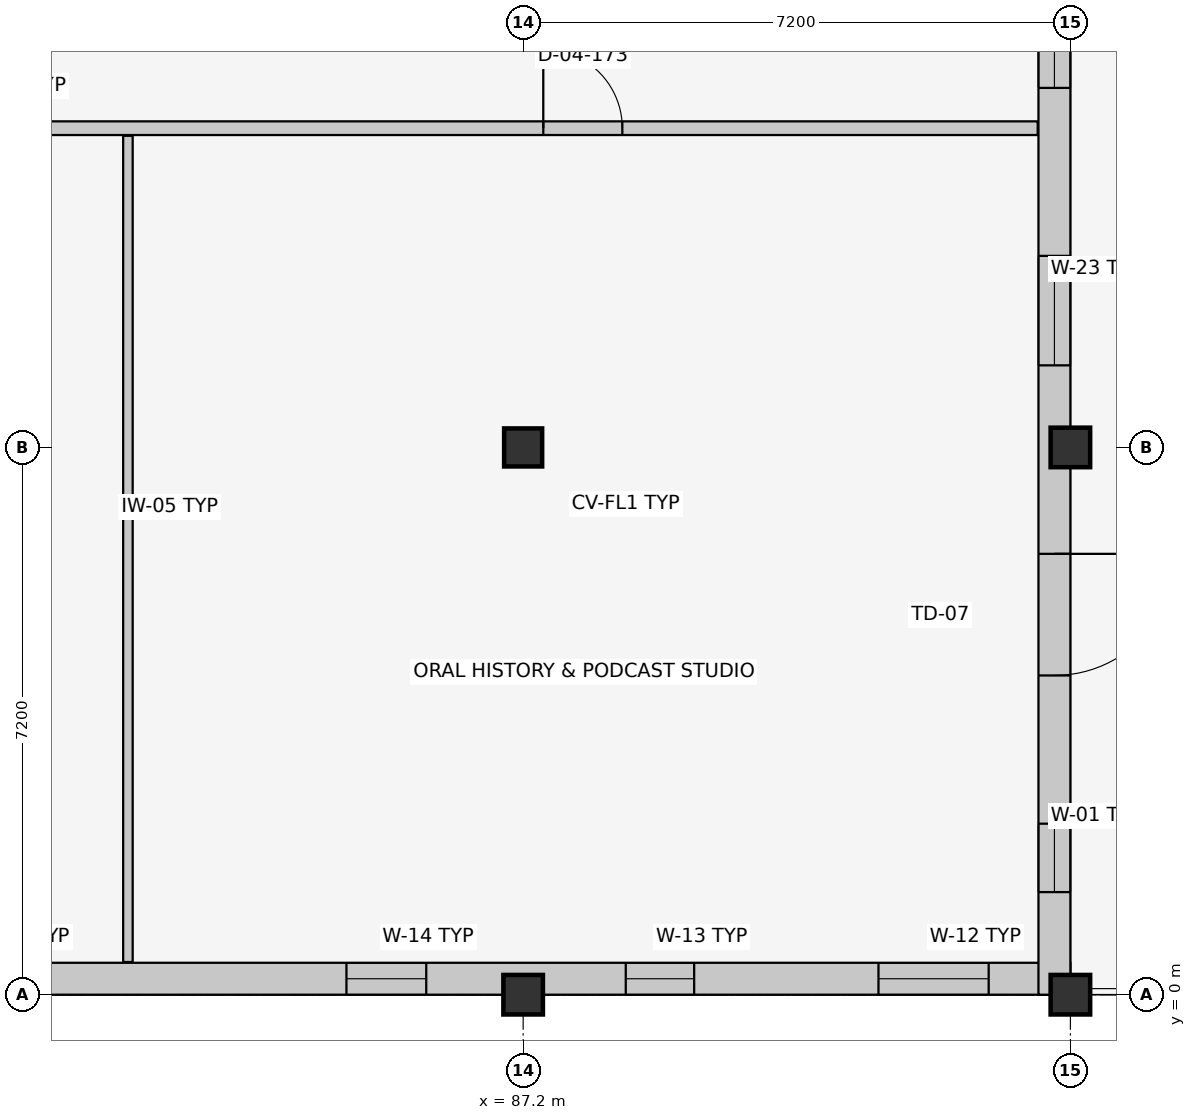
"""IFC4 building model, lengths in metres.
Left out: names, types, materials, properties, quantities, classifications, styles, units other than length and angle.
Written with IfcOpenShell. Run it as: python <this file> out.ifc"""

import sys

from ifc_helpers import new_model, si_unit, direction, frame, frame_2d, origin, origin_2d, place, context, subcontext, project, spatial, rectangle, extrude, element, fill, save


model = new_model("IFC4")
c1 = context("Model", 3, precision=1e-05, world=origin(), true_north=direction((0.0, 1.0)))
c2 = subcontext(c1, "Body", "Model", "MODEL_VIEW")
j1 = project(units=[si_unit("LENGTHUNIT", "METRE"), si_unit("PLANEANGLEUNIT", "RADIAN")], contexts=[c1])
p1 = place(None, origin())
s1 = spatial("IfcSite", under=j1, at=p1, CompositionType="ELEMENT")
p2 = place(p1, origin())
s2 = spatial("IfcBuilding", under=s1, at=p2, CompositionType="ELEMENT")
p3 = place(p2, frame((0.0, 0.0, 18.0)))
s3 = spatial("IfcBuildingStorey", under=s2, at=p3, CompositionType="ELEMENT", Elevation=18.0)
p4 = place(p3, frame((87.2, 0.0, 0.0), z_axis=(0.0, 0.0, 1.0), x_axis=(1.0, 0.0, 0.0)))
e1 = element("IfcColumn", 1, at=p4, inside=s3, PredefinedType="COLUMN", context=c2, shape_type="SweptSolid", body=[
    extrude(rectangle(XDim=0.52, YDim=0.52, at=origin_2d()), origin(), (0.0, 0.0, 1.0), 3.9),
])
p5 = place(p3, frame((87.2, 7.2, 0.0), z_axis=(0.0, 0.0, 1.0), x_axis=(1.0, 0.0, 0.0)))
e2 = element("IfcColumn", 2, at=p5, inside=s3, PredefinedType="COLUMN", context=c2, shape_type="SweptSolid", body=[
    extrude(rectangle(XDim=0.5, YDim=0.5, at=origin_2d()), origin(), (0.0, 0.0, 1.0), 3.9),
])
for number, where, z_axis, x_axis in (
    (3, (94.4, 0.0, 0.0), (0.0, 0.0, 1.0), (1.0, 0.0, 0.0)),
    (4, (94.4, 7.2, 0.0), (0.0, 0.0, 1.0), (1.0, 0.0, 0.0)),
):
    element("IfcColumn", number, at=place(p3, frame(where, z_axis=z_axis, x_axis=x_axis)), inside=s3, PredefinedType="COLUMN", context=c2, shape_type="SweptSolid", body=[
        extrude(rectangle(XDim=0.52, YDim=0.52, at=origin_2d()), origin(), (0.0, 0.0, 1.0), 3.9),
    ])
p6 = place(p3, frame((94.4, 0.21, 0.0), z_axis=(0.0, 0.0, 1.0), x_axis=(-1.0, 0.0, 0.0)))
e5 = element("IfcWall", 5, at=p6, inside=s3, PredefinedType="SOLIDWALL", context=c2, shape_type="SweptSolid", body=[
    extrude(rectangle(XDim=28.8, YDim=0.42, at=frame_2d((14.4, 0.0))), origin(), (0.0, 0.0, 1.0), 2.955),
])
p7 = place(p6, frame((1.075, 0.0, 0.9)))
e6 = element("IfcOpeningElement", 6, at=p7, cuts=e5, PredefinedType="OPENING", context=c2, shape_type="SweptSolid", body=[
    extrude(rectangle(XDim=1.45, YDim=1.45, at=frame_2d((0.725, 0.725))), frame((0.0, 0.222, 0.0), z_axis=(0.0, -1.0, 0.0), x_axis=(1.0, 0.0, 0.0)), (0.0, 0.0, 1.0), 0.444),
])
p8 = place(p6, frame((4.95, 0.0, 0.9)))
e7 = element("IfcOpeningElement", 7, at=p8, cuts=e5, PredefinedType="OPENING", context=c2, shape_type="SweptSolid", body=[
    extrude(rectangle(XDim=0.9, YDim=1.6, at=frame_2d((0.45, 0.8))), frame((0.0, 0.222, 0.0), z_axis=(0.0, -1.0, 0.0), x_axis=(1.0, 0.0, 0.0)), (0.0, 0.0, 1.0), 0.444),
])
p9 = place(p6, frame((8.475, 0.0, 0.9)))
e8 = element("IfcOpeningElement", 8, at=p9, cuts=e5, PredefinedType="OPENING", context=c2, shape_type="SweptSolid", body=[
    extrude(rectangle(XDim=1.05, YDim=1.6, at=frame_2d((0.525, 0.8))), frame((0.0, 0.222, 0.0), z_axis=(0.0, -1.0, 0.0), x_axis=(1.0, 0.0, 0.0)), (0.0, 0.0, 1.0), 0.444),
])
p10 = place(p6, frame((15.575, 0.0, 0.9)))
e9 = element("IfcOpeningElement", 9, at=p10, cuts=e5, PredefinedType="OPENING", context=c2, shape_type="SweptSolid", body=[
    extrude(rectangle(XDim=1.25, YDim=1.6, at=frame_2d((0.625, 0.8))), frame((0.0, 0.222, 0.0), z_axis=(0.0, -1.0, 0.0), x_axis=(1.0, 0.0, 0.0)), (0.0, 0.0, 1.0), 0.444),
])
p11 = place(p6, frame((19.11, 0.0, 0.9)))
e10 = element("IfcOpeningElement", 10, at=p11, cuts=e5, PredefinedType="OPENING", context=c2, shape_type="SweptSolid", body=[
    extrude(rectangle(XDim=1.38, YDim=1.6, at=frame_2d((0.69, 0.8))), frame((0.0, 0.222, 0.0), z_axis=(0.0, -1.0, 0.0), x_axis=(1.0, 0.0, 0.0)), (0.0, 0.0, 1.0), 0.444),
])
p12 = place(p6, frame((22.65, 0.0, 0.9)))
e11 = element("IfcOpeningElement", 11, at=p12, cuts=e5, PredefinedType="OPENING", context=c2, shape_type="SweptSolid", body=[
    extrude(rectangle(XDim=1.5, YDim=1.6, at=frame_2d((0.75, 0.8))), frame((0.0, 0.222, 0.0), z_axis=(0.0, -1.0, 0.0), x_axis=(1.0, 0.0, 0.0)), (0.0, 0.0, 1.0), 0.444),
])
p13 = place(p6, frame((26.5, 0.0, 0.9)))
e12 = element("IfcOpeningElement", 12, at=p13, cuts=e5, PredefinedType="OPENING", context=c2, shape_type="SweptSolid", body=[
    extrude(rectangle(XDim=1.0, YDim=1.75, at=frame_2d((0.5, 0.875))), frame((0.0, 0.222, 0.0), z_axis=(0.0, -1.0, 0.0), x_axis=(1.0, 0.0, 0.0)), (0.0, 0.0, 1.0), 0.444),
])
p14 = place(p3, frame((94.19, 21.6, 0.0), z_axis=(0.0, 0.0, 1.0), x_axis=(0.0, -1.0, 0.0)))
e13 = element("IfcWall", 13, at=p14, inside=s3, PredefinedType="SOLIDWALL", context=c2, shape_type="SweptSolid", body=[
    extrude(rectangle(XDim=21.6, YDim=0.42, at=frame_2d((10.8, 0.0))), origin(), (0.0, 0.0, 1.0), 3.055),
])
p15 = place(p14, frame((15.8, 0.0, 0.0)))
e14 = element("IfcOpeningElement", 14, at=p15, cuts=e13, PredefinedType="OPENING", context=c2, shape_type="SweptSolid", body=[
    extrude(rectangle(XDim=1.6, YDim=2.2, at=frame_2d((0.8, 1.1))), frame((0.0, 0.222, 0.0), z_axis=(0.0, -1.0, 0.0), x_axis=(1.0, 0.0, 0.0)), (0.0, 0.0, 1.0), 0.444),
])
p16 = place(p14, frame((1.24, 0.0, 0.9)))
e15 = element("IfcOpeningElement", 15, at=p16, cuts=e13, PredefinedType="OPENING", context=c2, shape_type="SweptSolid", body=[
    extrude(rectangle(XDim=1.12, YDim=1.75, at=frame_2d((0.56, 0.875))), frame((0.0, 0.222, 0.0), z_axis=(0.0, -1.0, 0.0), x_axis=(1.0, 0.0, 0.0)), (0.0, 0.0, 1.0), 0.444),
])
p17 = place(p14, frame((4.78, 0.0, 0.9)))
e16 = element("IfcOpeningElement", 16, at=p17, cuts=e13, PredefinedType="OPENING", context=c2, shape_type="SweptSolid", body=[
    extrude(rectangle(XDim=1.24, YDim=1.75, at=frame_2d((0.62, 0.875))), frame((0.0, 0.222, 0.0), z_axis=(0.0, -1.0, 0.0), x_axis=(1.0, 0.0, 0.0)), (0.0, 0.0, 1.0), 0.444),
])
p18 = place(p14, frame((8.33, 0.0, 0.9)))
e17 = element("IfcOpeningElement", 17, at=p18, cuts=e13, PredefinedType="OPENING", context=c2, shape_type="SweptSolid", body=[
    extrude(rectangle(XDim=1.34, YDim=1.75, at=frame_2d((0.67, 0.875))), frame((0.0, 0.222, 0.0), z_axis=(0.0, -1.0, 0.0), x_axis=(1.0, 0.0, 0.0)), (0.0, 0.0, 1.0), 0.444),
])
p19 = place(p14, frame((11.88, 0.0, 0.9)))
e18 = element("IfcOpeningElement", 18, at=p19, cuts=e13, PredefinedType="OPENING", context=c2, shape_type="SweptSolid", body=[
    extrude(rectangle(XDim=1.44, YDim=1.75, at=frame_2d((0.72, 0.875))), frame((0.0, 0.222, 0.0), z_axis=(0.0, -1.0, 0.0), x_axis=(1.0, 0.0, 0.0)), (0.0, 0.0, 1.0), 0.444),
])
p20 = place(p14, frame((19.35, 0.0, 0.9)))
e19 = element("IfcOpeningElement", 19, at=p20, cuts=e13, PredefinedType="OPENING", context=c2, shape_type="SweptSolid", body=[
    extrude(rectangle(XDim=0.9, YDim=1.35, at=frame_2d((0.45, 0.675))), frame((0.0, 0.222, 0.0), z_axis=(0.0, -1.0, 0.0), x_axis=(1.0, 0.0, 0.0)), (0.0, 0.0, 1.0), 0.444),
])
p21 = place(p3, frame((66.03, 11.4, 0.0), z_axis=(0.0, 0.0, 1.0), x_axis=(1.0, 0.0, 0.0)))
e20 = element("IfcWall", 20, at=p21, inside=s3, PredefinedType="PARTITIONING", context=c2, shape_type="SweptSolid", body=[
    extrude(rectangle(XDim=27.94, YDim=0.18, at=frame_2d((13.97, 0.0))), origin(), (0.0, 0.0, 1.0), 3.66),
])
p22 = place(p21, frame((7.445, 0.0, 0.0)))
e21 = element("IfcOpeningElement", 21, at=p22, cuts=e20, PredefinedType="OPENING", context=c2, shape_type="SweptSolid", body=[
    extrude(rectangle(XDim=1.08, YDim=2.15, at=frame_2d((0.54, 1.075))), frame((0.0, 0.102, 0.0), z_axis=(0.0, -1.0, 0.0), x_axis=(1.0, 0.0, 0.0)), (0.0, 0.0, 1.0), 0.204),
])
p23 = place(p21, frame((21.435, 0.0, 0.0)))
e22 = element("IfcOpeningElement", 22, at=p23, cuts=e20, PredefinedType="OPENING", context=c2, shape_type="SweptSolid", body=[
    extrude(rectangle(XDim=1.04, YDim=2.15, at=frame_2d((0.52, 1.075))), frame((0.0, 0.102, 0.0), z_axis=(0.0, -1.0, 0.0), x_axis=(1.0, 0.0, 0.0)), (0.0, 0.0, 1.0), 0.204),
])
p24 = place(p3, frame((82.0, 0.43, 0.0), z_axis=(0.0, 0.0, 1.0), x_axis=(0.0, 1.0, 0.0)))
e23 = element("IfcWall", 23, at=p24, inside=s3, PredefinedType="PARTITIONING", context=c2, shape_type="SweptSolid", body=[
    extrude(rectangle(XDim=10.87, YDim=0.125, at=frame_2d((5.435, 0.0))), origin(), (0.0, 0.0, 1.0), 3.66),
])
p25 = place(p7, origin())
e24 = element("IfcWindow", 24, at=p25, inside=s3, PartitioningType="SINGLE_PANEL", PredefinedType="WINDOW", context=c2, shape_type="SweptSolid", body=[
    extrude(rectangle(XDim=1.45, YDim=1.45, at=frame_2d((0.725, 0.725))), frame((0.0, 0.03, 0.0), z_axis=(0.0, -1.0, 0.0), x_axis=(1.0, 0.0, 0.0)), (0.0, 0.0, 1.0), 0.06),
])
fill(e6, e24)
p26 = place(p8, origin())
e25 = element("IfcWindow", 25, at=p26, inside=s3, PartitioningType="SINGLE_PANEL", PredefinedType="WINDOW", context=c2, shape_type="SweptSolid", body=[
    extrude(rectangle(XDim=0.9, YDim=1.6, at=frame_2d((0.45, 0.8))), frame((0.0, 0.03, 0.0), z_axis=(0.0, -1.0, 0.0), x_axis=(1.0, 0.0, 0.0)), (0.0, 0.0, 1.0), 0.06),
])
fill(e7, e25)
p27 = place(p9, origin())
e26 = element("IfcWindow", 26, at=p27, inside=s3, PartitioningType="SINGLE_PANEL", PredefinedType="WINDOW", context=c2, shape_type="SweptSolid", body=[
    extrude(rectangle(XDim=1.05, YDim=1.6, at=frame_2d((0.525, 0.8))), frame((0.0, 0.03, 0.0), z_axis=(0.0, -1.0, 0.0), x_axis=(1.0, 0.0, 0.0)), (0.0, 0.0, 1.0), 0.06),
])
fill(e8, e26)
p28 = place(p15, origin())
e27 = element("IfcDoor", 27, at=p28, inside=s3, OperationType="SINGLE_SWING_LEFT", PredefinedType="DOOR", context=c2, shape_type="SweptSolid", body=[
    extrude(rectangle(XDim=1.6, YDim=2.2, at=frame_2d((0.8, 1.1))), frame((0.0, 0.025, 0.0), z_axis=(0.0, -1.0, 0.0), x_axis=(1.0, 0.0, 0.0)), (0.0, 0.0, 1.0), 0.05),
])
fill(e14, e27)
p29 = place(p18, origin())
e28 = element("IfcWindow", 28, at=p29, inside=s3, PartitioningType="SINGLE_PANEL", PredefinedType="WINDOW", context=c2, shape_type="SweptSolid", body=[
    extrude(rectangle(XDim=1.34, YDim=1.75, at=frame_2d((0.67, 0.875))), frame((0.0, 0.03, 0.0), z_axis=(0.0, -1.0, 0.0), x_axis=(1.0, 0.0, 0.0)), (0.0, 0.0, 1.0), 0.06),
])
fill(e17, e28)
p30 = place(p19, origin())
e29 = element("IfcWindow", 29, at=p30, inside=s3, PartitioningType="SINGLE_PANEL", PredefinedType="WINDOW", context=c2, shape_type="SweptSolid", body=[
    extrude(rectangle(XDim=1.44, YDim=1.75, at=frame_2d((0.72, 0.875))), frame((0.0, 0.03, 0.0), z_axis=(0.0, -1.0, 0.0), x_axis=(1.0, 0.0, 0.0)), (0.0, 0.0, 1.0), 0.06),
])
fill(e18, e29)
p31 = place(p20, origin())
e30 = element("IfcWindow", 30, at=p31, inside=s3, PartitioningType="SINGLE_PANEL", PredefinedType="WINDOW", context=c2, shape_type="SweptSolid", body=[
    extrude(rectangle(XDim=0.9, YDim=1.35, at=frame_2d((0.45, 0.675))), frame((0.0, 0.03, 0.0), z_axis=(0.0, -1.0, 0.0), x_axis=(1.0, 0.0, 0.0)), (0.0, 0.0, 1.0), 0.06),
])
fill(e19, e30)
p32 = place(p23, origin())
e31 = element("IfcDoor", 31, at=p32, inside=s3, OperationType="SINGLE_SWING_LEFT", PredefinedType="DOOR", context=c2, shape_type="SweptSolid", body=[
    extrude(rectangle(XDim=1.04, YDim=2.15, at=frame_2d((0.52, 1.075))), frame((0.0, 0.025, 0.0), z_axis=(0.0, -1.0, 0.0), x_axis=(1.0, 0.0, 0.0)), (0.0, 0.0, 1.0), 0.05),
])
fill(e22, e31)
save(model, sys.argv[1])
